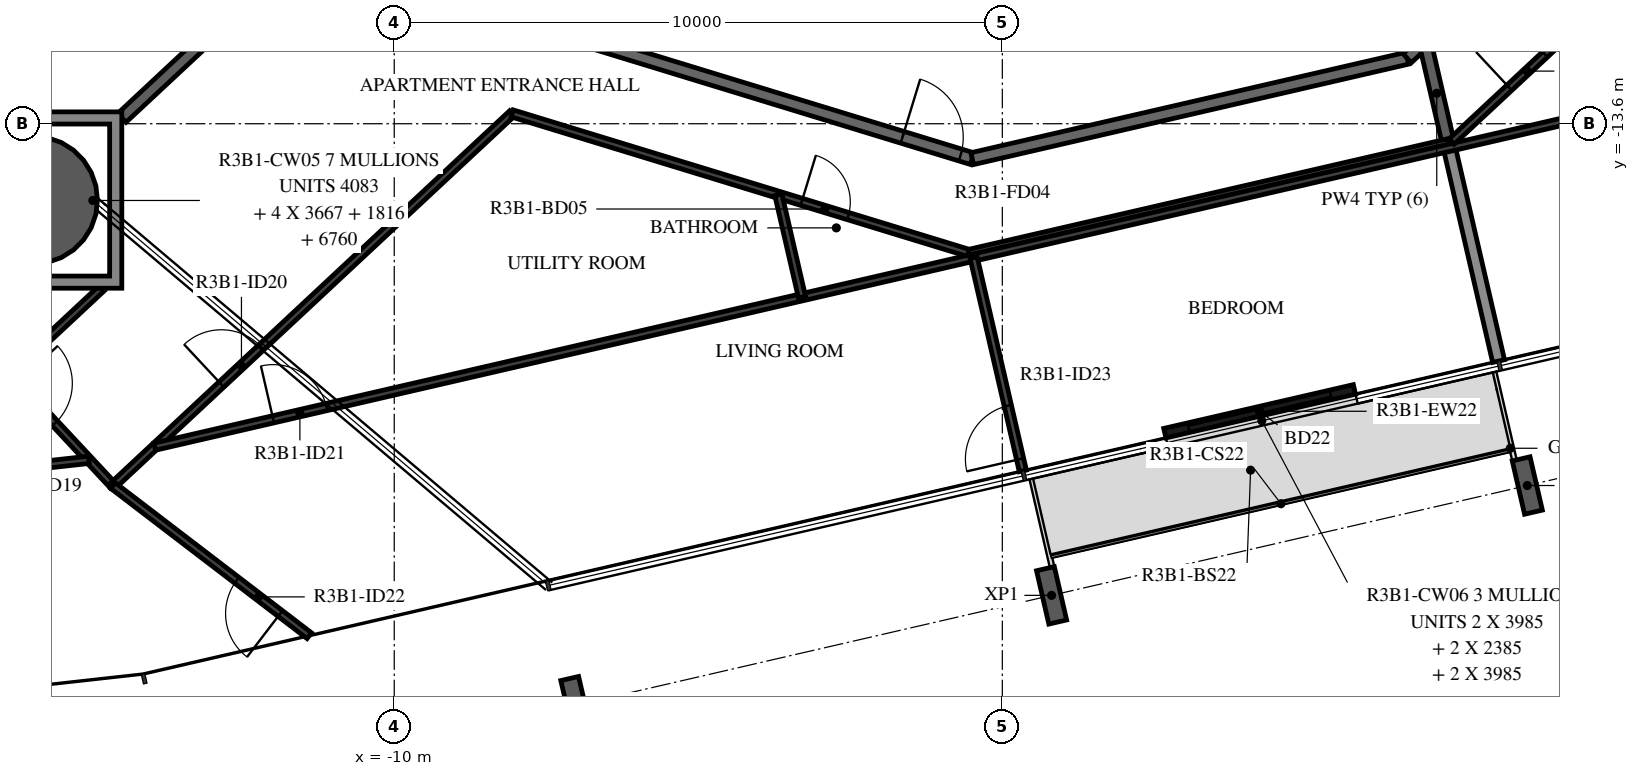
"""IFC4 building model, lengths in metres.
Left out: names, types, materials, properties, quantities, classifications, styles, units other than length and angle.
Written with IfcOpenShell. Run it as: python <this file> out.ifc"""

import sys

from ifc_helpers import new_model, si_unit, direction, frame, frame_2d, origin, origin_2d, place, context, subcontext, project, spatial, polyline, rectangle, hollow_circle, i_section, outline, extrude, element, fill, save


model = new_model("IFC4")
c1 = context("Model", 3, precision=1e-05, world=origin(), true_north=direction((0.0, 1.0)))
c2 = subcontext(c1, "Body", "Model", "MODEL_VIEW")
j1 = project(units=[si_unit("LENGTHUNIT", "METRE"), si_unit("PLANEANGLEUNIT", "RADIAN")], contexts=[c1])
p1 = place(None, origin())
s1 = spatial("IfcSite", under=j1, at=p1, CompositionType="ELEMENT")
p2 = place(p1, origin())
s2 = spatial("IfcBuilding", under=s1, at=p2, CompositionType="ELEMENT")
p3 = place(p2, frame((0.0, 0.0, 123.9)))
s3 = spatial("IfcBuildingStorey", under=s2, at=p3, CompositionType="ELEMENT", Elevation=123.9)
p4 = place(p3, frame((-15.93, -14.855, -0.38), z_axis=(0.0, 0.0, 1.0), x_axis=(1.0, 0.0, 0.0)))
e1 = element("IfcColumn", 1, at=p4, inside=s3, PredefinedType="COLUMN", context=c2, shape_type="SweptSolid", body=[
    extrude(hollow_circle(Radius=1.05, WallThickness=0.05, at=origin_2d()), origin(), (0.0, 0.0, 1.0), 3.5),
])
for number, where, z_axis, x_axis in (
    (2, (8.634, -19.55, -0.38), (0.0, 0.0, 1.0), (-0.974, -0.225, 0.0)),
    (3, (-7.013, -23.162, -0.38), (0.0, 0.0, 1.0), (-0.974, -0.225, 0.0)),
    (4, (0.81, -21.356, -0.38), (0.0, 0.0, 1.0), (-0.974, -0.225, 0.0)),
):
    element("IfcColumn", number, at=place(p3, frame(where, z_axis=z_axis, x_axis=x_axis)), inside=s3, PredefinedType="COLUMN", context=c2, shape_type="SweptSolid", body=[
        extrude(i_section(OverallWidth=0.3, OverallDepth=0.9, WebThickness=0.019, FlangeThickness=0.035, FilletRadius=0.03, at=origin_2d()), origin(), (0.0, 0.0, 1.0), 3.5),
    ])
p5 = place(p3, frame((2.673, -18.689, 0.0), z_axis=(0.0, 0.0, 1.0), x_axis=(0.974360325718, 0.224993234715, 0.0)))
e5 = element("IfcWall", 5, at=p5, inside=s3, PredefinedType="STANDARD", context=c2, shape_type="SweptSolid", body=[
    extrude(rectangle(XDim=3.2, YDim=0.16, at=frame_2d((1.6, 0.0))), origin(), (0.0, 0.0, 1.0), 3.12),
])
p6 = place(p5, frame((0.4, 0.0, 0.0)))
e6 = element("IfcOpeningElement", 6, at=p6, cuts=e5, PredefinedType="OPENING", context=c2, shape_type="SweptSolid", body=[
    extrude(rectangle(XDim=2.4, YDim=2.4, at=frame_2d((1.2, 1.2))), frame((0.0, 0.09, 0.0), z_axis=(0.0, -1.0, 0.0), x_axis=(1.0, 0.0, 0.0)), (0.0, 0.0, 1.0), 0.18),
])
p7 = place(p3, frame((-7.516, -12.028, 0.0), z_axis=(0.0, 0.0, 1.0), x_axis=(0.956306642771, -0.292365533182, 0.0)))
e7 = element("IfcWall", 7, at=p7, inside=s3, PredefinedType="STANDARD", context=c2, shape_type="SweptSolid", body=[
    extrude(rectangle(XDim=7.342, YDim=0.2, at=frame_2d((3.671, 0.0))), origin(), (0.0, 0.0, 1.0), 3.12),
])
p8 = place(p7, frame((6.142, 0.0, 0.0)))
e8 = element("IfcOpeningElement", 8, at=p8, cuts=e7, PredefinedType="OPENING", context=c2, shape_type="SweptSolid", body=[
    extrude(rectangle(XDim=1.0, YDim=2.1, at=frame_2d((0.5, 1.05))), frame((0.0, 0.11, 0.0), z_axis=(0.0, -1.0, 0.0), x_axis=(1.0, 0.0, 0.0)), (0.0, 0.0, 1.0), 0.22),
])
p9 = place(p3, frame((-0.495, -14.175, 0.0), z_axis=(0.0, 0.0, 1.0), x_axis=(0.974376622151, 0.224922649383, 0.0)))
e9 = element("IfcWall", 9, at=p9, inside=s3, PredefinedType="STANDARD", context=c2, shape_type="SweptSolid", body=[
    extrude(rectangle(XDim=7.342, YDim=0.2, at=frame_2d((3.671, 0.0))), origin(), (0.0, 0.0, 1.0), 3.12),
])
p10 = place(p3, frame((6.659, -12.523, 0.0), z_axis=(0.0, 0.0, 1.0), x_axis=(0.731350455479, 0.682001841105, 0.0)))
e10 = element("IfcWall", 10, at=p10, inside=s3, PredefinedType="STANDARD", context=c2, shape_type="SweptSolid", body=[
    extrude(rectangle(XDim=7.342, YDim=0.2, at=frame_2d((3.671, 0.0))), origin(), (0.0, 0.0, 1.0), 3.12),
])
p11 = place(p10, frame((0.597, 0.0, 0.0)))
e11 = element("IfcOpeningElement", 11, at=p11, cuts=e10, PredefinedType="OPENING", context=c2, shape_type="SweptSolid", body=[
    extrude(rectangle(XDim=1.0, YDim=2.1, at=frame_2d((0.5, 1.05))), frame((0.0, 0.11, 0.0), z_axis=(0.0, -1.0, 0.0), x_axis=(1.0, 0.0, 0.0)), (0.0, 0.0, 1.0), 0.22),
])
p12 = place(p3, frame((-14.479, -13.504, 0.0), z_axis=(0.0, 0.0, 1.0), x_axis=(0.731329393611, 0.682024426278, 0.0)))
e12 = element("IfcWall", 12, at=p12, inside=s3, PredefinedType="STANDARD", context=c2, shape_type="SweptSolid", body=[
    extrude(rectangle(XDim=5.892, YDim=0.2, at=frame_2d((2.946, 0.0))), origin(), (0.0, 0.0, 1.0), 3.12),
])
p13 = place(p3, frame((7.34, -13.946, 0.0), z_axis=(0.0, 0.0, 1.0), x_axis=(-0.224849249613, 0.974393562658, 0.0)))
e13 = element("IfcWall", 13, at=p13, inside=s3, PredefinedType="STANDARD", context=c2, shape_type="SweptSolid", body=[
    extrude(rectangle(XDim=1.738, YDim=0.2, at=frame_2d((0.869, 0.0))), origin(), (0.0, 0.0, 1.0), 3.12),
])
p14 = place(p3, frame((8.161, -17.504, 0.0), z_axis=(0.0, 0.0, 1.0), x_axis=(-0.224943703639, 0.9743717618, 0.0)))
e14 = element("IfcWall", 14, at=p14, inside=s3, PredefinedType="STANDARD", context=c2, shape_type="SweptSolid", body=[
    extrude(rectangle(XDim=3.6, YDim=0.2, at=frame_2d((1.8, 0.0))), origin(), (0.0, 0.0, 1.0), 2.73),
])
p15 = place(p3, frame((-14.81, -16.305, 0.0), z_axis=(0.0, 0.0, 1.0), x_axis=(-0.73134426424, -0.682008480272, 0.0)))
e15 = element("IfcWall", 15, at=p15, inside=s3, PredefinedType="PARTITIONING", context=c2, shape_type="SweptSolid", body=[
    extrude(rectangle(XDim=2.078, YDim=0.12, at=frame_2d((1.039, 0.0))), origin(), (0.0, 0.0, 1.0), 3.12),
])
p16 = place(p3, frame((-16.33, -17.723, 0.0), z_axis=(0.0, 0.0, 1.0), x_axis=(0.682018966854, -0.731334484933, 0.0)))
e16 = element("IfcWall", 16, at=p16, inside=s3, PredefinedType="PARTITIONING", context=c2, shape_type="SweptSolid", body=[
    extrude(rectangle(XDim=2.5, YDim=0.12, at=frame_2d((1.25, 0.0))), origin(), (0.0, 0.0, 1.0), 3.12),
])
p17 = place(p16, frame((0.2, 0.0, 0.0)))
e17 = element("IfcOpeningElement", 17, at=p17, cuts=e16, PredefinedType="OPENING", context=c2, shape_type="SweptSolid", body=[
    extrude(rectangle(XDim=0.9, YDim=2.1, at=frame_2d((0.45, 1.05))), frame((0.0, 0.07, 0.0), z_axis=(0.0, -1.0, 0.0), x_axis=(1.0, 0.0, 0.0)), (0.0, 0.0, 1.0), 0.14),
])
p18 = place(p3, frame((-14.625, -19.551, 0.0), z_axis=(0.0, 0.0, 1.0), x_axis=(0.731348282704, 0.682004171091, 0.0)))
e18 = element("IfcWall", 18, at=p18, inside=s3, PredefinedType="PARTITIONING", context=c2, shape_type="SweptSolid", body=[
    extrude(rectangle(XDim=8.975, YDim=0.12, at=frame_2d((4.488, 0.0))), origin(), (0.0, 0.0, 1.0), 3.12),
])
p19 = place(p18, frame((2.438, 0.0, 0.0)))
e19 = element("IfcOpeningElement", 19, at=p19, cuts=e18, PredefinedType="OPENING", context=c2, shape_type="SweptSolid", body=[
    extrude(rectangle(XDim=0.9, YDim=2.1, at=frame_2d((0.45, 1.05))), frame((0.0, 0.07, 0.0), z_axis=(0.0, -1.0, 0.0), x_axis=(1.0, 0.0, 0.0)), (0.0, 0.0, 1.0), 0.14),
])
p20 = place(p3, frame((-8.061, -13.43, 0.0), z_axis=(0.0, 0.0, 1.0), x_axis=(0.956302336653, -0.292379617814, 0.0)))
e20 = element("IfcWall", 20, at=p20, inside=s3, PredefinedType="PARTITIONING", context=c2, shape_type="SweptSolid", body=[
    extrude(rectangle(XDim=7.855, YDim=0.12, at=frame_2d((3.927, 0.0))), origin(), (0.0, 0.0, 1.0), 3.12),
])
p21 = place(p20, frame((4.979, 0.0, 0.0)))
e21 = element("IfcOpeningElement", 21, at=p21, cuts=e20, PredefinedType="OPENING", context=c2, shape_type="SweptSolid", body=[
    extrude(rectangle(XDim=0.8, YDim=2.1, at=frame_2d((0.4, 1.05))), frame((0.0, 0.07, 0.0), z_axis=(0.0, -1.0, 0.0), x_axis=(1.0, 0.0, 0.0)), (0.0, 0.0, 1.0), 0.14),
])
p22 = place(p3, frame((-0.549, -15.727, 0.0), z_axis=(0.0, 0.0, 1.0), x_axis=(0.97436829548, 0.224958717908, 0.0)))
e22 = element("IfcWall", 22, at=p22, inside=s3, PredefinedType="PARTITIONING", context=c2, shape_type="SweptSolid", body=[
    extrude(rectangle(XDim=8.087, YDim=0.12, at=frame_2d((4.044, 0.0))), origin(), (0.0, 0.0, 1.0), 3.12),
])
p23 = place(p3, frame((-15.956, -19.231, 0.0), z_axis=(0.0, 0.0, 1.0), x_axis=(0.993867897435, 0.110573968218, 0.0)))
e23 = element("IfcWall", 23, at=p23, inside=s3, PredefinedType="PARTITIONING", context=c2, shape_type="SweptSolid", body=[
    extrude(rectangle(XDim=0.941, YDim=0.12, at=frame_2d((0.47, 0.0))), origin(), (0.0, 0.0, 1.0), 3.12),
])
p24 = place(p3, frame((-11.397, -22.019, 0.0), z_axis=(0.0, 0.0, 1.0), x_axis=(-0.794391941464, 0.60740550157, 0.0)))
e24 = element("IfcWall", 24, at=p24, inside=s3, PredefinedType="PARTITIONING", context=c2, shape_type="SweptSolid", body=[
    extrude(rectangle(XDim=4.063, YDim=0.12, at=frame_2d((2.032, 0.0))), origin(), (0.0, 0.0, 1.0), 3.12),
])
p25 = place(p24, frame((0.6, 0.0, 0.0)))
e25 = element("IfcOpeningElement", 25, at=p25, cuts=e24, PredefinedType="OPENING", context=c2, shape_type="SweptSolid", body=[
    extrude(rectangle(XDim=0.9, YDim=2.1, at=frame_2d((0.45, 1.05))), frame((0.0, 0.07, 0.0), z_axis=(0.0, -1.0, 0.0), x_axis=(1.0, 0.0, 0.0)), (0.0, 0.0, 1.0), 0.14),
])
p26 = place(p3, frame((-13.939, -18.911, 0.0), z_axis=(0.0, 0.0, 1.0), x_axis=(0.974369607456, 0.224953035245, 0.0)))
e26 = element("IfcWall", 26, at=p26, inside=s3, PredefinedType="PARTITIONING", context=c2, shape_type="SweptSolid", body=[
    extrude(rectangle(XDim=33.934, YDim=0.12, at=frame_2d((16.967, 0.0))), origin(), (0.0, 0.0, 1.0), 3.12),
])
p27 = place(p26, frame((2.0, 0.0, 0.0)))
e27 = element("IfcOpeningElement", 27, at=p27, cuts=e26, PredefinedType="OPENING", context=c2, shape_type="SweptSolid", body=[
    extrude(rectangle(XDim=0.9, YDim=2.1, at=frame_2d((0.45, 1.05))), frame((0.0, 0.07, 0.0), z_axis=(0.0, -1.0, 0.0), x_axis=(1.0, 0.0, 0.0)), (0.0, 0.0, 1.0), 0.14),
])
p28 = place(p26, frame((28.154, 0.0, 0.0)))
e28 = element("IfcOpeningElement", 28, at=p28, cuts=e26, PredefinedType="OPENING", context=c2, shape_type="SweptSolid", body=[
    extrude(rectangle(XDim=0.9, YDim=2.1, at=frame_2d((0.45, 1.05))), frame((0.0, 0.07, 0.0), z_axis=(0.0, -1.0, 0.0), x_axis=(1.0, 0.0, 0.0)), (0.0, 0.0, 1.0), 0.14),
])
p29 = place(p26, frame((30.039, 0.0, 0.0)))
e29 = element("IfcOpeningElement", 29, at=p29, cuts=e26, PredefinedType="OPENING", context=c2, shape_type="SweptSolid", body=[
    extrude(rectangle(XDim=0.9, YDim=2.1, at=frame_2d((0.45, 1.05))), frame((0.0, 0.07, 0.0), z_axis=(0.0, -1.0, 0.0), x_axis=(1.0, 0.0, 0.0)), (0.0, 0.0, 1.0), 0.14),
])
p30 = place(p3, frame((-3.294, -16.454, 0.0), z_axis=(0.0, 0.0, 1.0), x_axis=(-0.224890438003, 0.974384057184, 0.0)))
e30 = element("IfcWall", 30, at=p30, inside=s3, PredefinedType="PARTITIONING", context=c2, shape_type="SweptSolid", body=[
    extrude(rectangle(XDim=1.729, YDim=0.12, at=frame_2d((0.865, 0.0))), origin(), (0.0, 0.0, 1.0), 3.12),
])
p31 = place(p3, frame((0.338, -19.31, 0.0), z_axis=(0.0, 0.0, 1.0), x_axis=(-0.224943703639, 0.9743717618, 0.0)))
e31 = element("IfcWall", 31, at=p31, inside=s3, PredefinedType="PARTITIONING", context=c2, shape_type="SweptSolid", body=[
    extrude(rectangle(XDim=3.6, YDim=0.12, at=frame_2d((1.8, 0.0))), origin(), (0.0, 0.0, 1.0), 2.73),
])
p32 = place(p31, frame((0.2, 0.0, 0.0)))
e32 = element("IfcOpeningElement", 32, at=p32, cuts=e31, PredefinedType="OPENING", context=c2, shape_type="SweptSolid", body=[
    extrude(rectangle(XDim=0.9, YDim=2.1, at=frame_2d((0.45, 1.05))), frame((0.0, 0.07, 0.0), z_axis=(0.0, -1.0, 0.0), x_axis=(1.0, 0.0, 0.0)), (0.0, 0.0, 1.0), 0.14),
])
p33 = place(p3, frame((7.388, -13.894, 0.0), z_axis=(0.0, 0.0, 1.0), x_axis=(0.731346321845, 0.682006273815, 0.0)))
e33 = element("IfcWall", 33, at=p33, inside=s3, PredefinedType="PARTITIONING", context=c2, shape_type="SweptSolid", body=[
    extrude(rectangle(XDim=7.585, YDim=0.12, at=frame_2d((3.793, 0.0))), origin(), (0.0, 0.0, 1.0), 3.12),
])
p34 = place(p33, frame((1.3, 0.0, 0.0)))
e34 = element("IfcOpeningElement", 34, at=p34, cuts=e33, PredefinedType="OPENING", context=c2, shape_type="SweptSolid", body=[
    extrude(rectangle(XDim=0.8, YDim=2.1, at=frame_2d((0.4, 1.05))), frame((0.0, 0.07, 0.0), z_axis=(0.0, -1.0, 0.0), x_axis=(1.0, 0.0, 0.0)), (0.0, 0.0, 1.0), 0.14),
])
p35 = place(p3, origin())
e35 = element("IfcWall", 35, at=p35, inside=s3, PredefinedType="STANDARD", context=c2, shape_type="SweptSolid", body=[
    extrude(outline(polyline([(-14.48, -13.405), (-14.48, -16.305), (-17.38, -16.305), (-17.38, -13.405), (-14.48, -13.405)]), holes=[polyline([(-17.18, -16.105), (-14.68, -16.105), (-14.68, -13.605), (-17.18, -13.605), (-17.18, -16.105)])]), origin(), (0.0, 0.0, 1.0), 3.12),
])
p36 = place(p6, origin())
e36 = element("IfcDoor", 36, at=p36, inside=s3, OperationType="DOUBLE_DOOR_SLIDING", PredefinedType="DOOR", context=c2, shape_type="SweptSolid", body=[
    extrude(rectangle(XDim=2.4, YDim=2.4, at=frame_2d((1.2, 1.2))), frame((0.0, 0.025, 0.0), z_axis=(0.0, -1.0, 0.0), x_axis=(1.0, 0.0, 0.0)), (0.0, 0.0, 1.0), 0.05),
])
fill(e6, e36)
p37 = place(p8, origin())
e37 = element("IfcDoor", 37, at=p37, inside=s3, OperationType="SINGLE_SWING_LEFT", PredefinedType="DOOR", context=c2, shape_type="SweptSolid", body=[
    extrude(rectangle(XDim=1.0, YDim=2.1, at=frame_2d((0.5, 1.05))), frame((0.0, 0.025, 0.0), z_axis=(0.0, -1.0, 0.0), x_axis=(1.0, 0.0, 0.0)), (0.0, 0.0, 1.0), 0.05),
])
fill(e8, e37)
p38 = place(p17, origin())
e38 = element("IfcDoor", 38, at=p38, inside=s3, OperationType="SINGLE_SWING_LEFT", PredefinedType="DOOR", context=c2, shape_type="SweptSolid", body=[
    extrude(rectangle(XDim=0.9, YDim=2.1, at=frame_2d((0.45, 1.05))), frame((0.0, 0.025, 0.0), z_axis=(0.0, -1.0, 0.0), x_axis=(1.0, 0.0, 0.0)), (0.0, 0.0, 1.0), 0.05),
])
fill(e17, e38)
p39 = place(p19, origin())
e39 = element("IfcDoor", 39, at=p39, inside=s3, OperationType="SINGLE_SWING_LEFT", PredefinedType="DOOR", context=c2, shape_type="SweptSolid", body=[
    extrude(rectangle(XDim=0.9, YDim=2.1, at=frame_2d((0.45, 1.05))), frame((0.0, 0.025, 0.0), z_axis=(0.0, -1.0, 0.0), x_axis=(1.0, 0.0, 0.0)), (0.0, 0.0, 1.0), 0.05),
])
fill(e19, e39)
p40 = place(p21, origin())
e40 = element("IfcDoor", 40, at=p40, inside=s3, OperationType="SINGLE_SWING_LEFT", PredefinedType="DOOR", context=c2, shape_type="SweptSolid", body=[
    extrude(rectangle(XDim=0.8, YDim=2.1, at=frame_2d((0.4, 1.05))), frame((0.0, 0.025, 0.0), z_axis=(0.0, -1.0, 0.0), x_axis=(1.0, 0.0, 0.0)), (0.0, 0.0, 1.0), 0.05),
])
fill(e21, e40)
p41 = place(p27, origin())
e41 = element("IfcDoor", 41, at=p41, inside=s3, OperationType="SINGLE_SWING_LEFT", PredefinedType="DOOR", context=c2, shape_type="SweptSolid", body=[
    extrude(rectangle(XDim=0.9, YDim=2.1, at=frame_2d((0.45, 1.05))), frame((0.0, 0.025, 0.0), z_axis=(0.0, -1.0, 0.0), x_axis=(1.0, 0.0, 0.0)), (0.0, 0.0, 1.0), 0.05),
])
fill(e27, e41)
p42 = place(p25, origin())
e42 = element("IfcDoor", 42, at=p42, inside=s3, OperationType="SINGLE_SWING_LEFT", PredefinedType="DOOR", context=c2, shape_type="SweptSolid", body=[
    extrude(rectangle(XDim=0.9, YDim=2.1, at=frame_2d((0.45, 1.05))), frame((0.0, 0.025, 0.0), z_axis=(0.0, -1.0, 0.0), x_axis=(1.0, 0.0, 0.0)), (0.0, 0.0, 1.0), 0.05),
])
fill(e25, e42)
p43 = place(p32, origin())
e43 = element("IfcDoor", 43, at=p43, inside=s3, OperationType="SINGLE_SWING_RIGHT", PredefinedType="DOOR", context=c2, shape_type="SweptSolid", body=[
    extrude(rectangle(XDim=0.9, YDim=2.1, at=frame_2d((0.45, 1.05))), frame((0.0, 0.025, 0.0), z_axis=(0.0, -1.0, 0.0), x_axis=(1.0, 0.0, 0.0)), (0.0, 0.0, 1.0), 0.05),
])
fill(e32, e43)
p44 = place(p34, origin())
e44 = element("IfcDoor", 44, at=p44, inside=s3, OperationType="SINGLE_SWING_RIGHT", PredefinedType="DOOR", context=c2, shape_type="SweptSolid", body=[
    extrude(rectangle(XDim=0.8, YDim=2.1, at=frame_2d((0.4, 1.05))), frame((0.0, 0.025, 0.0), z_axis=(0.0, -1.0, 0.0), x_axis=(1.0, 0.0, 0.0)), (0.0, 0.0, 1.0), 0.05),
])
fill(e34, e44)
save(model, sys.argv[1])
